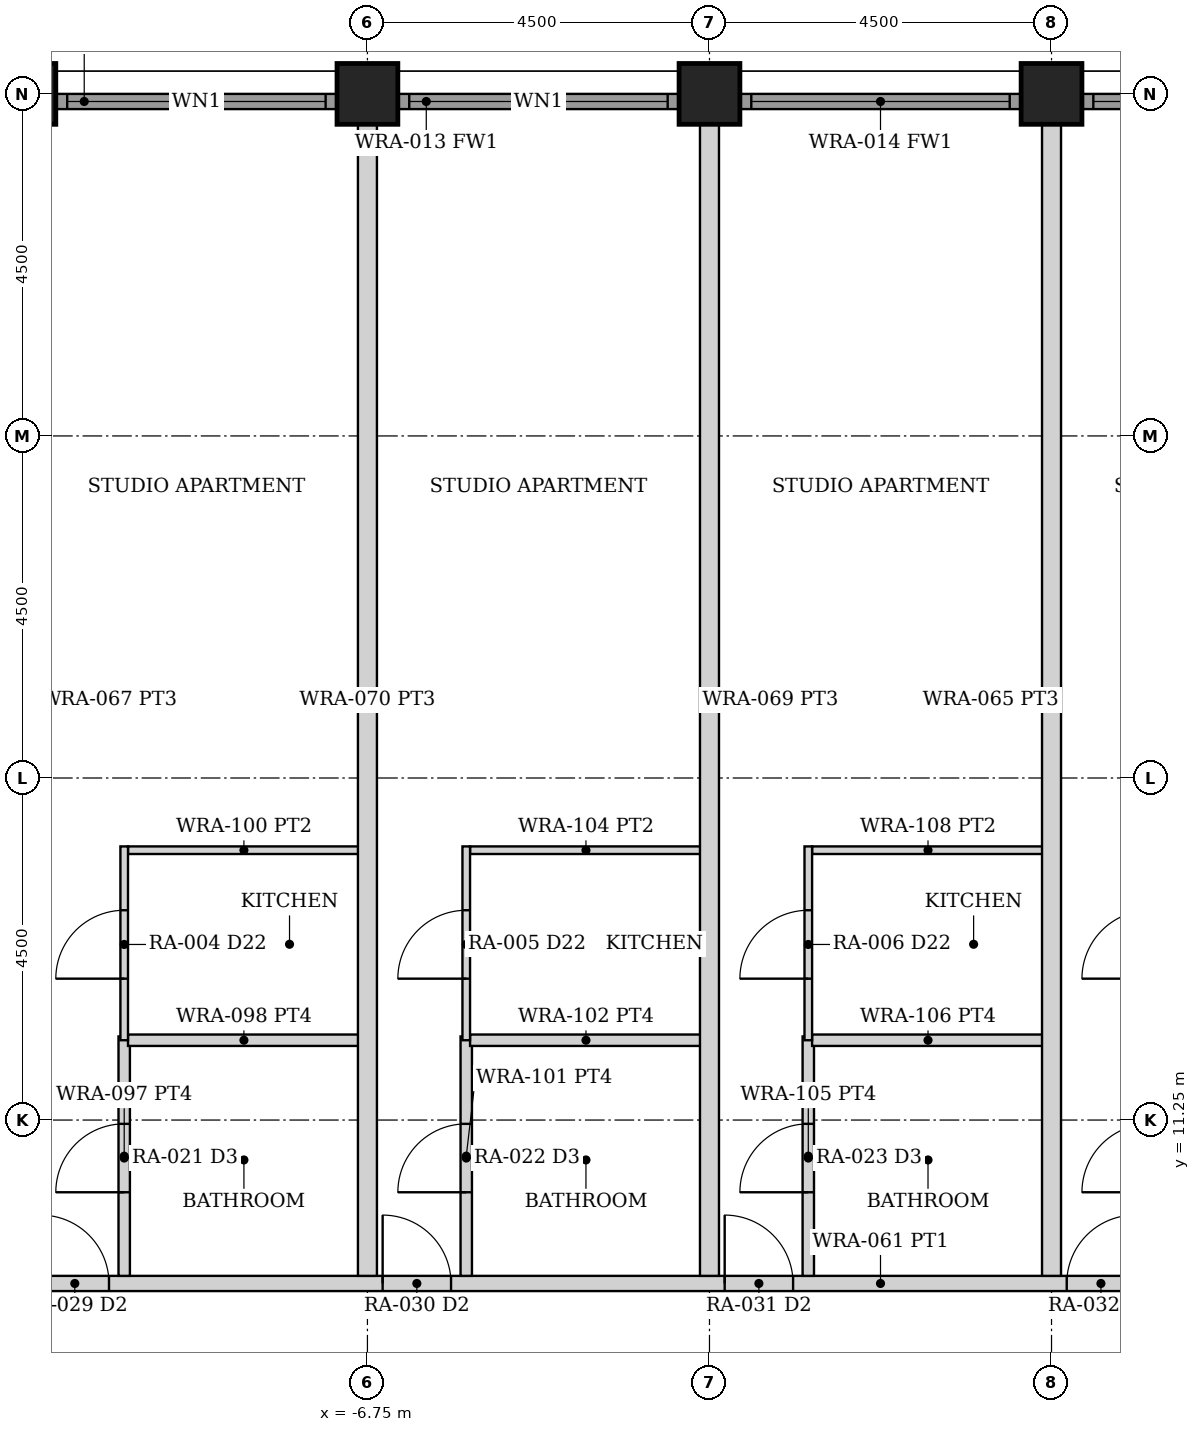
"""IFC4 building model, lengths in metres.
Left out: names, types, materials, properties, quantities, classifications, styles, units other than length and angle.
Written with IfcOpenShell. Run it as: python <this file> out.ifc"""

import sys

from ifc_helpers import new_model, si_unit, direction, frame, frame_2d, origin, origin_2d, place, context, subcontext, project, spatial, rectangle, hollow_rectangle, extrude, element, fill, save


model = new_model("IFC4")
c1 = context("Model", 3, precision=1e-05, world=origin(), true_north=direction((0.0, 1.0)))
c2 = subcontext(c1, "Body", "Model", "MODEL_VIEW")
j1 = project(units=[si_unit("LENGTHUNIT", "METRE"), si_unit("PLANEANGLEUNIT", "RADIAN")], contexts=[c1])
p1 = place(None, origin())
s1 = spatial("IfcSite", under=j1, at=p1, CompositionType="ELEMENT")
p2 = place(p1, origin())
s2 = spatial("IfcBuilding", under=s1, at=p2, CompositionType="ELEMENT")
p3 = place(p2, frame((0.0, 0.0, 30.0)))
s3 = spatial("IfcBuildingStorey", under=s2, at=p3, CompositionType="ELEMENT", Elevation=30.0)
for number, where, z_axis, x_axis in (
    (1, (-11.25, 24.75, 0.0), (0.0, 0.0, 1.0), (0.0, 1.0, 0.0)),
    (2, (-6.75, 24.75, 0.0), (0.0, 0.0, 1.0), (0.0, 1.0, 0.0)),
    (3, (-2.25, 24.75, 0.0), (0.0, 0.0, 1.0), (0.0, 1.0, 0.0)),
    (4, (2.25, 24.75, 0.0), (0.0, 0.0, 1.0), (0.0, 1.0, 0.0)),
):
    element("IfcColumn", number, at=place(p3, frame(where, z_axis=z_axis, x_axis=x_axis)), inside=s3, PredefinedType="COLUMN", context=c2, shape_type="SweptSolid", body=[
        extrude(hollow_rectangle(XDim=0.8, YDim=0.8, WallThickness=0.08, at=origin_2d()), origin(), (0.0, 0.0, 1.0), 3.5),
    ])
p4 = place(p3, frame((-10.845, 24.65, 0.0), z_axis=(0.0, 0.0, 1.0), x_axis=(1.0, 0.0, 0.0)))
e5 = element("IfcWall", 5, at=p4, inside=s3, PredefinedType="SOLIDWALL", context=c2, shape_type="SweptSolid", body=[
    extrude(rectangle(XDim=3.69, YDim=0.2, at=frame_2d((1.845, 0.0))), origin(), (0.0, 0.0, 1.0), 2.379),
])
p5 = place(p4, frame((0.145, 0.0, 0.3)))
e6 = element("IfcOpeningElement", 6, at=p5, cuts=e5, PredefinedType="OPENING", context=c2, shape_type="SweptSolid", body=[
    extrude(rectangle(XDim=3.4, YDim=1.929, at=frame_2d((1.7, 0.964))), frame((0.0, 0.11, 0.0), z_axis=(0.0, -1.0, 0.0), x_axis=(1.0, 0.0, 0.0)), (0.0, 0.0, 1.0), 0.22),
])
p6 = place(p3, frame((-6.345, 24.65, 0.0), z_axis=(0.0, 0.0, 1.0), x_axis=(1.0, 0.0, 0.0)))
e7 = element("IfcWall", 7, at=p6, inside=s3, PredefinedType="SOLIDWALL", context=c2, shape_type="SweptSolid", body=[
    extrude(rectangle(XDim=3.69, YDim=0.2, at=frame_2d((1.845, 0.0))), origin(), (0.0, 0.0, 1.0), 2.379),
])
p7 = place(p6, frame((0.145, 0.0, 0.3)))
e8 = element("IfcOpeningElement", 8, at=p7, cuts=e7, PredefinedType="OPENING", context=c2, shape_type="SweptSolid", body=[
    extrude(rectangle(XDim=3.4, YDim=1.929, at=frame_2d((1.7, 0.964))), frame((0.0, 0.11, 0.0), z_axis=(0.0, -1.0, 0.0), x_axis=(1.0, 0.0, 0.0)), (0.0, 0.0, 1.0), 0.22),
])
p8 = place(p3, frame((-1.845, 24.65, 0.0), z_axis=(0.0, 0.0, 1.0), x_axis=(1.0, 0.0, 0.0)))
e9 = element("IfcWall", 9, at=p8, inside=s3, PredefinedType="SOLIDWALL", context=c2, shape_type="SweptSolid", body=[
    extrude(rectangle(XDim=3.69, YDim=0.2, at=frame_2d((1.845, 0.0))), origin(), (0.0, 0.0, 1.0), 2.379),
])
p9 = place(p8, frame((0.145, 0.0, 0.3)))
e10 = element("IfcOpeningElement", 10, at=p9, cuts=e9, PredefinedType="OPENING", context=c2, shape_type="SweptSolid", body=[
    extrude(rectangle(XDim=3.4, YDim=1.929, at=frame_2d((1.7, 0.964))), frame((0.0, 0.11, 0.0), z_axis=(0.0, -1.0, 0.0), x_axis=(1.0, 0.0, 0.0)), (0.0, 0.0, 1.0), 0.22),
])
p10 = place(p3, frame((2.655, 24.65, 0.0), z_axis=(0.0, 0.0, 1.0), x_axis=(1.0, 0.0, 0.0)))
e11 = element("IfcWall", 11, at=p10, inside=s3, PredefinedType="SOLIDWALL", context=c2, shape_type="SweptSolid", body=[
    extrude(rectangle(XDim=3.69, YDim=0.2, at=frame_2d((1.845, 0.0))), origin(), (0.0, 0.0, 1.0), 2.379),
])
p11 = place(p10, frame((0.145, 0.0, 0.3)))
e12 = element("IfcOpeningElement", 12, at=p11, cuts=e11, PredefinedType="OPENING", context=c2, shape_type="SweptSolid", body=[
    extrude(rectangle(XDim=3.4, YDim=1.929, at=frame_2d((1.7, 0.964))), frame((0.0, 0.11, 0.0), z_axis=(0.0, -1.0, 0.0), x_axis=(1.0, 0.0, 0.0)), (0.0, 0.0, 1.0), 0.22),
])
p12 = place(p3, frame((-24.55, 9.1, 0.0), z_axis=(0.0, 0.0, 1.0), x_axis=(1.0, 0.0, 0.0)))
e13 = element("IfcWall", 13, at=p12, inside=s3, PredefinedType="PARTITIONING", context=c2, shape_type="SweptSolid", body=[
    extrude(rectangle(XDim=49.1, YDim=0.2, at=frame_2d((24.55, 0.0))), origin(), (0.0, 0.0, 1.0), 2.373),
])
p13 = place(p12, frame((5.1, 0.0, 0.0)))
e14 = element("IfcOpeningElement", 14, at=p13, cuts=e13, PredefinedType="OPENING", context=c2, shape_type="SweptSolid", body=[
    extrude(rectangle(XDim=0.9, YDim=2.1, at=frame_2d((0.45, 1.05))), frame((0.0, 0.11, 0.0), z_axis=(0.0, -1.0, 0.0), x_axis=(1.0, 0.0, 0.0)), (0.0, 0.0, 1.0), 0.22),
])
p14 = place(p12, frame((9.0, 0.0, 0.0)))
e15 = element("IfcOpeningElement", 15, at=p14, cuts=e13, PredefinedType="OPENING", context=c2, shape_type="SweptSolid", body=[
    extrude(rectangle(XDim=0.9, YDim=2.1, at=frame_2d((0.45, 1.05))), frame((0.0, 0.11, 0.0), z_axis=(0.0, -1.0, 0.0), x_axis=(1.0, 0.0, 0.0)), (0.0, 0.0, 1.0), 0.22),
])
p15 = place(p12, frame((13.5, 0.0, 0.0)))
e16 = element("IfcOpeningElement", 16, at=p15, cuts=e13, PredefinedType="OPENING", context=c2, shape_type="SweptSolid", body=[
    extrude(rectangle(XDim=0.9, YDim=2.1, at=frame_2d((0.45, 1.05))), frame((0.0, 0.11, 0.0), z_axis=(0.0, -1.0, 0.0), x_axis=(1.0, 0.0, 0.0)), (0.0, 0.0, 1.0), 0.22),
])
p16 = place(p12, frame((18.0, 0.0, 0.0)))
e17 = element("IfcOpeningElement", 17, at=p16, cuts=e13, PredefinedType="OPENING", context=c2, shape_type="SweptSolid", body=[
    extrude(rectangle(XDim=0.9, YDim=2.1, at=frame_2d((0.45, 1.05))), frame((0.0, 0.11, 0.0), z_axis=(0.0, -1.0, 0.0), x_axis=(1.0, 0.0, 0.0)), (0.0, 0.0, 1.0), 0.22),
])
p17 = place(p12, frame((22.5, 0.0, 0.0)))
e18 = element("IfcOpeningElement", 18, at=p17, cuts=e13, PredefinedType="OPENING", context=c2, shape_type="SweptSolid", body=[
    extrude(rectangle(XDim=0.9, YDim=2.1, at=frame_2d((0.45, 1.05))), frame((0.0, 0.11, 0.0), z_axis=(0.0, -1.0, 0.0), x_axis=(1.0, 0.0, 0.0)), (0.0, 0.0, 1.0), 0.22),
])
p18 = place(p12, frame((27.0, 0.0, 0.0)))
e19 = element("IfcOpeningElement", 19, at=p18, cuts=e13, PredefinedType="OPENING", context=c2, shape_type="SweptSolid", body=[
    extrude(rectangle(XDim=0.9, YDim=2.1, at=frame_2d((0.45, 1.05))), frame((0.0, 0.11, 0.0), z_axis=(0.0, -1.0, 0.0), x_axis=(1.0, 0.0, 0.0)), (0.0, 0.0, 1.0), 0.22),
])
p19 = place(p12, frame((31.5, 0.0, 0.0)))
e20 = element("IfcOpeningElement", 20, at=p19, cuts=e13, PredefinedType="OPENING", context=c2, shape_type="SweptSolid", body=[
    extrude(rectangle(XDim=0.9, YDim=2.1, at=frame_2d((0.45, 1.05))), frame((0.0, 0.11, 0.0), z_axis=(0.0, -1.0, 0.0), x_axis=(1.0, 0.0, 0.0)), (0.0, 0.0, 1.0), 0.22),
])
p20 = place(p12, frame((36.0, 0.0, 0.0)))
e21 = element("IfcOpeningElement", 21, at=p20, cuts=e13, PredefinedType="OPENING", context=c2, shape_type="SweptSolid", body=[
    extrude(rectangle(XDim=0.9, YDim=2.1, at=frame_2d((0.45, 1.05))), frame((0.0, 0.11, 0.0), z_axis=(0.0, -1.0, 0.0), x_axis=(1.0, 0.0, 0.0)), (0.0, 0.0, 1.0), 0.22),
])
p21 = place(p12, frame((43.1, 0.0, 0.0)))
e22 = element("IfcOpeningElement", 22, at=p21, cuts=e13, PredefinedType="OPENING", context=c2, shape_type="SweptSolid", body=[
    extrude(rectangle(XDim=0.9, YDim=2.1, at=frame_2d((0.45, 1.05))), frame((0.0, 0.11, 0.0), z_axis=(0.0, -1.0, 0.0), x_axis=(1.0, 0.0, 0.0)), (0.0, 0.0, 1.0), 0.22),
])
p22 = place(p3, frame((-9.95, 9.2, 0.0), z_axis=(0.0, 0.0, 1.0), x_axis=(0.0, 1.0, 0.0)))
e23 = element("IfcWall", 23, at=p22, inside=s3, PredefinedType="PARTITIONING", context=c2, shape_type="SweptSolid", body=[
    extrude(rectangle(XDim=3.15, YDim=0.15, at=frame_2d((1.575, 0.0))), origin(), (0.0, 0.0, 1.0), 2.373),
])
p23 = place(p22, frame((1.1, 0.0, 0.0)))
e24 = element("IfcOpeningElement", 24, at=p23, cuts=e23, PredefinedType="OPENING", context=c2, shape_type="SweptSolid", body=[
    extrude(rectangle(XDim=0.9, YDim=2.1, at=frame_2d((0.45, 1.05))), frame((0.0, 0.085, 0.0), z_axis=(0.0, -1.0, 0.0), x_axis=(1.0, 0.0, 0.0)), (0.0, 0.0, 1.0), 0.17),
])
p24 = place(p3, frame((-9.9, 12.3, 0.0), z_axis=(0.0, 0.0, 1.0), x_axis=(1.0, 0.0, 0.0)))
e25 = element("IfcWall", 25, at=p24, inside=s3, PredefinedType="PARTITIONING", context=c2, shape_type="SweptSolid", body=[
    extrude(rectangle(XDim=3.05, YDim=0.15, at=frame_2d((1.525, 0.0))), origin(), (0.0, 0.0, 1.0), 2.373),
])
p25 = place(p3, frame((-9.9, 14.8, 0.0), z_axis=(0.0, 0.0, 1.0), x_axis=(1.0, 0.0, 0.0)))
e26 = element("IfcWall", 26, at=p25, inside=s3, PredefinedType="PARTITIONING", context=c2, shape_type="SweptSolid", body=[
    extrude(rectangle(XDim=3.05, YDim=0.1, at=frame_2d((1.525, 0.0))), origin(), (0.0, 0.0, 1.0), 2.373),
])
p26 = place(p3, frame((-9.95, 12.3, 0.0), z_axis=(0.0, 0.0, 1.0), x_axis=(0.0, 1.0, 0.0)))
e27 = element("IfcWall", 27, at=p26, inside=s3, PredefinedType="PARTITIONING", context=c2, shape_type="SweptSolid", body=[
    extrude(rectangle(XDim=2.55, YDim=0.1, at=frame_2d((1.275, 0.0))), origin(), (0.0, 0.0, 1.0), 2.373),
])
p27 = place(p26, frame((0.81, 0.0, 0.0)))
e28 = element("IfcOpeningElement", 28, at=p27, cuts=e27, PredefinedType="OPENING", context=c2, shape_type="SweptSolid", body=[
    extrude(rectangle(XDim=0.9, YDim=2.1, at=frame_2d((0.45, 1.05))), frame((0.0, 0.06, 0.0), z_axis=(0.0, -1.0, 0.0), x_axis=(1.0, 0.0, 0.0)), (0.0, 0.0, 1.0), 0.12),
])
p28 = place(p3, frame((-5.45, 9.2, 0.0), z_axis=(0.0, 0.0, 1.0), x_axis=(0.0, 1.0, 0.0)))
e29 = element("IfcWall", 29, at=p28, inside=s3, PredefinedType="PARTITIONING", context=c2, shape_type="SweptSolid", body=[
    extrude(rectangle(XDim=3.15, YDim=0.15, at=frame_2d((1.575, 0.0))), origin(), (0.0, 0.0, 1.0), 2.373),
])
p29 = place(p28, frame((1.1, 0.0, 0.0)))
e30 = element("IfcOpeningElement", 30, at=p29, cuts=e29, PredefinedType="OPENING", context=c2, shape_type="SweptSolid", body=[
    extrude(rectangle(XDim=0.9, YDim=2.1, at=frame_2d((0.45, 1.05))), frame((0.0, 0.085, 0.0), z_axis=(0.0, -1.0, 0.0), x_axis=(1.0, 0.0, 0.0)), (0.0, 0.0, 1.0), 0.17),
])
p30 = place(p3, frame((-5.4, 12.3, 0.0), z_axis=(0.0, 0.0, 1.0), x_axis=(1.0, 0.0, 0.0)))
e31 = element("IfcWall", 31, at=p30, inside=s3, PredefinedType="PARTITIONING", context=c2, shape_type="SweptSolid", body=[
    extrude(rectangle(XDim=3.05, YDim=0.15, at=frame_2d((1.525, 0.0))), origin(), (0.0, 0.0, 1.0), 2.373),
])
p31 = place(p3, frame((-5.4, 14.8, 0.0), z_axis=(0.0, 0.0, 1.0), x_axis=(1.0, 0.0, 0.0)))
e32 = element("IfcWall", 32, at=p31, inside=s3, PredefinedType="PARTITIONING", context=c2, shape_type="SweptSolid", body=[
    extrude(rectangle(XDim=3.05, YDim=0.1, at=frame_2d((1.525, 0.0))), origin(), (0.0, 0.0, 1.0), 2.373),
])
p32 = place(p3, frame((-5.45, 12.3, 0.0), z_axis=(0.0, 0.0, 1.0), x_axis=(0.0, 1.0, 0.0)))
e33 = element("IfcWall", 33, at=p32, inside=s3, PredefinedType="PARTITIONING", context=c2, shape_type="SweptSolid", body=[
    extrude(rectangle(XDim=2.55, YDim=0.1, at=frame_2d((1.275, 0.0))), origin(), (0.0, 0.0, 1.0), 2.373),
])
p33 = place(p32, frame((0.81, 0.0, 0.0)))
e34 = element("IfcOpeningElement", 34, at=p33, cuts=e33, PredefinedType="OPENING", context=c2, shape_type="SweptSolid", body=[
    extrude(rectangle(XDim=0.9, YDim=2.1, at=frame_2d((0.45, 1.05))), frame((0.0, 0.06, 0.0), z_axis=(0.0, -1.0, 0.0), x_axis=(1.0, 0.0, 0.0)), (0.0, 0.0, 1.0), 0.12),
])
p34 = place(p3, frame((-0.95, 9.2, 0.0), z_axis=(0.0, 0.0, 1.0), x_axis=(0.0, 1.0, 0.0)))
e35 = element("IfcWall", 35, at=p34, inside=s3, PredefinedType="PARTITIONING", context=c2, shape_type="SweptSolid", body=[
    extrude(rectangle(XDim=3.15, YDim=0.15, at=frame_2d((1.575, 0.0))), origin(), (0.0, 0.0, 1.0), 2.373),
])
p35 = place(p34, frame((1.1, 0.0, 0.0)))
e36 = element("IfcOpeningElement", 36, at=p35, cuts=e35, PredefinedType="OPENING", context=c2, shape_type="SweptSolid", body=[
    extrude(rectangle(XDim=0.9, YDim=2.1, at=frame_2d((0.45, 1.05))), frame((0.0, 0.085, 0.0), z_axis=(0.0, -1.0, 0.0), x_axis=(1.0, 0.0, 0.0)), (0.0, 0.0, 1.0), 0.17),
])
p36 = place(p3, frame((-0.9, 12.3, 0.0), z_axis=(0.0, 0.0, 1.0), x_axis=(1.0, 0.0, 0.0)))
e37 = element("IfcWall", 37, at=p36, inside=s3, PredefinedType="PARTITIONING", context=c2, shape_type="SweptSolid", body=[
    extrude(rectangle(XDim=3.05, YDim=0.15, at=frame_2d((1.525, 0.0))), origin(), (0.0, 0.0, 1.0), 2.373),
])
p37 = place(p3, frame((-0.9, 14.8, 0.0), z_axis=(0.0, 0.0, 1.0), x_axis=(1.0, 0.0, 0.0)))
e38 = element("IfcWall", 38, at=p37, inside=s3, PredefinedType="PARTITIONING", context=c2, shape_type="SweptSolid", body=[
    extrude(rectangle(XDim=3.05, YDim=0.1, at=frame_2d((1.525, 0.0))), origin(), (0.0, 0.0, 1.0), 2.373),
])
p38 = place(p3, frame((-0.95, 12.3, 0.0), z_axis=(0.0, 0.0, 1.0), x_axis=(0.0, 1.0, 0.0)))
e39 = element("IfcWall", 39, at=p38, inside=s3, PredefinedType="PARTITIONING", context=c2, shape_type="SweptSolid", body=[
    extrude(rectangle(XDim=2.55, YDim=0.1, at=frame_2d((1.275, 0.0))), origin(), (0.0, 0.0, 1.0), 2.373),
])
p39 = place(p38, frame((0.81, 0.0, 0.0)))
e40 = element("IfcOpeningElement", 40, at=p39, cuts=e39, PredefinedType="OPENING", context=c2, shape_type="SweptSolid", body=[
    extrude(rectangle(XDim=0.9, YDim=2.1, at=frame_2d((0.45, 1.05))), frame((0.0, 0.06, 0.0), z_axis=(0.0, -1.0, 0.0), x_axis=(1.0, 0.0, 0.0)), (0.0, 0.0, 1.0), 0.12),
])
for number, where, z_axis, x_axis in (
    (41, (-6.75, 9.2, 0.0), (0.0, 0.0, 1.0), (0.0, 1.0, 0.0)),
    (42, (-2.25, 9.2, 0.0), (0.0, 0.0, 1.0), (0.0, 1.0, 0.0)),
    (43, (2.25, 9.2, 0.0), (0.0, 0.0, 1.0), (0.0, 1.0, 0.0)),
):
    element("IfcWall", number, at=place(p3, frame(where, z_axis=z_axis, x_axis=x_axis)), inside=s3, PredefinedType="PARTITIONING", context=c2, shape_type="SweptSolid", body=[
        extrude(rectangle(XDim=15.15, YDim=0.25, at=frame_2d((7.575, 0.0))), origin(), (0.0, 0.0, 1.0), 2.373),
    ])
p40 = place(p5, origin())
e44 = element("IfcWindow", 44, at=p40, inside=s3, PartitioningType="SINGLE_PANEL", PredefinedType="WINDOW", context=c2, shape_type="SweptSolid", body=[
    extrude(rectangle(XDim=3.4, YDim=1.929, at=frame_2d((1.7, 0.964))), frame((0.0, 0.03, 0.0), z_axis=(0.0, -1.0, 0.0), x_axis=(1.0, 0.0, 0.0)), (0.0, 0.0, 1.0), 0.06),
])
fill(e6, e44)
p41 = place(p7, origin())
e45 = element("IfcWindow", 45, at=p41, inside=s3, PartitioningType="SINGLE_PANEL", PredefinedType="WINDOW", context=c2, shape_type="SweptSolid", body=[
    extrude(rectangle(XDim=3.4, YDim=1.929, at=frame_2d((1.7, 0.964))), frame((0.0, 0.03, 0.0), z_axis=(0.0, -1.0, 0.0), x_axis=(1.0, 0.0, 0.0)), (0.0, 0.0, 1.0), 0.06),
])
fill(e8, e45)
p42 = place(p9, origin())
e46 = element("IfcWindow", 46, at=p42, inside=s3, PartitioningType="SINGLE_PANEL", PredefinedType="WINDOW", context=c2, shape_type="SweptSolid", body=[
    extrude(rectangle(XDim=3.4, YDim=1.929, at=frame_2d((1.7, 0.964))), frame((0.0, 0.03, 0.0), z_axis=(0.0, -1.0, 0.0), x_axis=(1.0, 0.0, 0.0)), (0.0, 0.0, 1.0), 0.06),
])
fill(e10, e46)
p43 = place(p11, origin())
e47 = element("IfcWindow", 47, at=p43, inside=s3, PartitioningType="SINGLE_PANEL", PredefinedType="WINDOW", context=c2, shape_type="SweptSolid", body=[
    extrude(rectangle(XDim=3.4, YDim=1.929, at=frame_2d((1.7, 0.964))), frame((0.0, 0.03, 0.0), z_axis=(0.0, -1.0, 0.0), x_axis=(1.0, 0.0, 0.0)), (0.0, 0.0, 1.0), 0.06),
])
fill(e12, e47)
p44 = place(p15, origin())
e48 = element("IfcDoor", 48, at=p44, inside=s3, OperationType="SINGLE_SWING_LEFT", PredefinedType="DOOR", context=c2, shape_type="SweptSolid", body=[
    extrude(rectangle(XDim=0.9, YDim=2.1, at=frame_2d((0.45, 1.05))), frame((0.0, 0.025, 0.0), z_axis=(0.0, -1.0, 0.0), x_axis=(1.0, 0.0, 0.0)), (0.0, 0.0, 1.0), 0.05),
])
fill(e16, e48)
p45 = place(p23, origin())
e49 = element("IfcDoor", 49, at=p45, inside=s3, OperationType="SINGLE_SWING_LEFT", PredefinedType="DOOR", context=c2, shape_type="SweptSolid", body=[
    extrude(rectangle(XDim=0.9, YDim=2.1, at=frame_2d((0.45, 1.05))), frame((0.0, 0.025, 0.0), z_axis=(0.0, -1.0, 0.0), x_axis=(1.0, 0.0, 0.0)), (0.0, 0.0, 1.0), 0.05),
])
fill(e24, e49)
p46 = place(p27, origin())
e50 = element("IfcDoor", 50, at=p46, inside=s3, OperationType="SINGLE_SWING_LEFT", PredefinedType="DOOR", context=c2, shape_type="SweptSolid", body=[
    extrude(rectangle(XDim=0.9, YDim=2.1, at=frame_2d((0.45, 1.05))), frame((0.0, 0.025, 0.0), z_axis=(0.0, -1.0, 0.0), x_axis=(1.0, 0.0, 0.0)), (0.0, 0.0, 1.0), 0.05),
])
fill(e28, e50)
p47 = place(p16, origin())
e51 = element("IfcDoor", 51, at=p47, inside=s3, OperationType="SINGLE_SWING_LEFT", PredefinedType="DOOR", context=c2, shape_type="SweptSolid", body=[
    extrude(rectangle(XDim=0.9, YDim=2.1, at=frame_2d((0.45, 1.05))), frame((0.0, 0.025, 0.0), z_axis=(0.0, -1.0, 0.0), x_axis=(1.0, 0.0, 0.0)), (0.0, 0.0, 1.0), 0.05),
])
fill(e17, e51)
p48 = place(p29, origin())
e52 = element("IfcDoor", 52, at=p48, inside=s3, OperationType="SINGLE_SWING_LEFT", PredefinedType="DOOR", context=c2, shape_type="SweptSolid", body=[
    extrude(rectangle(XDim=0.9, YDim=2.1, at=frame_2d((0.45, 1.05))), frame((0.0, 0.025, 0.0), z_axis=(0.0, -1.0, 0.0), x_axis=(1.0, 0.0, 0.0)), (0.0, 0.0, 1.0), 0.05),
])
fill(e30, e52)
p49 = place(p33, origin())
e53 = element("IfcDoor", 53, at=p49, inside=s3, OperationType="SINGLE_SWING_LEFT", PredefinedType="DOOR", context=c2, shape_type="SweptSolid", body=[
    extrude(rectangle(XDim=0.9, YDim=2.1, at=frame_2d((0.45, 1.05))), frame((0.0, 0.025, 0.0), z_axis=(0.0, -1.0, 0.0), x_axis=(1.0, 0.0, 0.0)), (0.0, 0.0, 1.0), 0.05),
])
fill(e34, e53)
p50 = place(p17, origin())
e54 = element("IfcDoor", 54, at=p50, inside=s3, OperationType="SINGLE_SWING_LEFT", PredefinedType="DOOR", context=c2, shape_type="SweptSolid", body=[
    extrude(rectangle(XDim=0.9, YDim=2.1, at=frame_2d((0.45, 1.05))), frame((0.0, 0.025, 0.0), z_axis=(0.0, -1.0, 0.0), x_axis=(1.0, 0.0, 0.0)), (0.0, 0.0, 1.0), 0.05),
])
fill(e18, e54)
p51 = place(p35, origin())
e55 = element("IfcDoor", 55, at=p51, inside=s3, OperationType="SINGLE_SWING_LEFT", PredefinedType="DOOR", context=c2, shape_type="SweptSolid", body=[
    extrude(rectangle(XDim=0.9, YDim=2.1, at=frame_2d((0.45, 1.05))), frame((0.0, 0.025, 0.0), z_axis=(0.0, -1.0, 0.0), x_axis=(1.0, 0.0, 0.0)), (0.0, 0.0, 1.0), 0.05),
])
fill(e36, e55)
p52 = place(p39, origin())
e56 = element("IfcDoor", 56, at=p52, inside=s3, OperationType="SINGLE_SWING_LEFT", PredefinedType="DOOR", context=c2, shape_type="SweptSolid", body=[
    extrude(rectangle(XDim=0.9, YDim=2.1, at=frame_2d((0.45, 1.05))), frame((0.0, 0.025, 0.0), z_axis=(0.0, -1.0, 0.0), x_axis=(1.0, 0.0, 0.0)), (0.0, 0.0, 1.0), 0.05),
])
fill(e40, e56)
p53 = place(p18, origin())
e57 = element("IfcDoor", 57, at=p53, inside=s3, OperationType="SINGLE_SWING_RIGHT", PredefinedType="DOOR", context=c2, shape_type="SweptSolid", body=[
    extrude(rectangle(XDim=0.9, YDim=2.1, at=frame_2d((0.45, 1.05))), frame((0.0, 0.025, 0.0), z_axis=(0.0, -1.0, 0.0), x_axis=(1.0, 0.0, 0.0)), (0.0, 0.0, 1.0), 0.05),
])
fill(e19, e57)
save(model, sys.argv[1])
